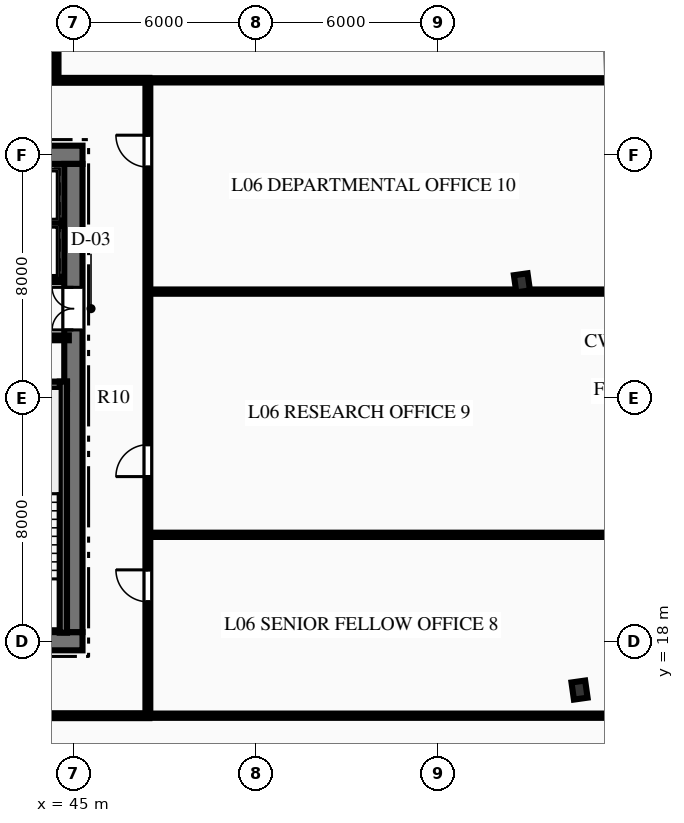
"""IFC4 building model, lengths in metres.
Left out: names, types, materials, properties, quantities, classifications, styles, units other than length and angle.
Written with IfcOpenShell. Run it as: python <this file> out.ifc"""

import sys

from ifc_helpers import new_model, si_unit, direction, frame, frame_2d, origin, origin_2d, place, context, subcontext, project, spatial, rectangle, i_section, extrude, element, fill, save


model = new_model("IFC4")
c1 = context("Model", 3, precision=1e-05, world=origin(), true_north=direction((0.0, 1.0)))
c2 = subcontext(c1, "Body", "Model", "MODEL_VIEW")
j1 = project(units=[si_unit("LENGTHUNIT", "METRE"), si_unit("PLANEANGLEUNIT", "RADIAN")], contexts=[c1])
p1 = place(None, origin())
s1 = spatial("IfcSite", under=j1, at=p1, CompositionType="ELEMENT")
p2 = place(p1, origin())
s2 = spatial("IfcBuilding", under=s1, at=p2, CompositionType="ELEMENT")
p3 = place(p2, frame((0.0, 0.0, 32.7)))
s3 = spatial("IfcBuildingStorey", under=s2, at=p3, CompositionType="ELEMENT", Elevation=32.7)
p4 = place(p3, frame((26.7, 18.0, 0.0), z_axis=(0.0, 0.0, 1.0), x_axis=(1.0, 0.0, 0.0)))
e1 = element("IfcWall", 1, at=p4, inside=s3, PredefinedType="SHEAR", context=c2, shape_type="SweptSolid", body=[
    extrude(rectangle(XDim=18.6, YDim=0.6, at=frame_2d((9.3, 0.0))), origin(), (0.0, 0.0, 1.0), 3.75),
])
p5 = place(p4, frame((7.4, 0.0, 0.0)))
e2 = element("IfcOpeningElement", 2, at=p5, cuts=e1, PredefinedType="OPENING", context=c2, shape_type="SweptSolid", body=[
    extrude(rectangle(XDim=1.1, YDim=2.15, at=frame_2d((0.55, 1.075))), frame((0.0, 0.31, 0.0), z_axis=(0.0, -1.0, 0.0), x_axis=(1.0, 0.0, 0.0)), (0.0, 0.0, 1.0), 0.62),
])
p6 = place(p4, frame((10.1, 0.0, 0.0)))
e3 = element("IfcOpeningElement", 3, at=p6, cuts=e1, PredefinedType="OPENING", context=c2, shape_type="SweptSolid", body=[
    extrude(rectangle(XDim=1.1, YDim=2.15, at=frame_2d((0.55, 1.075))), frame((0.0, 0.31, 0.0), z_axis=(0.0, -1.0, 0.0), x_axis=(1.0, 0.0, 0.0)), (0.0, 0.0, 1.0), 0.62),
])
p7 = place(p3, frame((26.7, 34.0, 0.0), z_axis=(0.0, 0.0, 1.0), x_axis=(1.0, 0.0, 0.0)))
e4 = element("IfcWall", 4, at=p7, inside=s3, PredefinedType="SHEAR", context=c2, shape_type="SweptSolid", body=[
    extrude(rectangle(XDim=18.6, YDim=0.6, at=frame_2d((9.3, 0.0))), origin(), (0.0, 0.0, 1.0), 3.75),
])
p8 = place(p7, frame((1.265, 0.0, 0.0)))
e5 = element("IfcOpeningElement", 5, at=p8, cuts=e4, PredefinedType="OPENING", context=c2, shape_type="SweptSolid", body=[
    extrude(rectangle(XDim=1.1, YDim=2.15, at=frame_2d((0.55, 1.075))), frame((0.0, 0.31, 0.0), z_axis=(0.0, -1.0, 0.0), x_axis=(1.0, 0.0, 0.0)), (0.0, 0.0, 1.0), 0.62),
])
p9 = place(p7, frame((3.515, 0.0, 0.0)))
e6 = element("IfcOpeningElement", 6, at=p9, cuts=e4, PredefinedType="OPENING", context=c2, shape_type="SweptSolid", body=[
    extrude(rectangle(XDim=1.1, YDim=2.15, at=frame_2d((0.55, 1.075))), frame((0.0, 0.31, 0.0), z_axis=(0.0, -1.0, 0.0), x_axis=(1.0, 0.0, 0.0)), (0.0, 0.0, 1.0), 0.62),
])
p10 = place(p7, frame((13.985, 0.0, 0.0)))
e7 = element("IfcOpeningElement", 7, at=p10, cuts=e4, PredefinedType="OPENING", context=c2, shape_type="SweptSolid", body=[
    extrude(rectangle(XDim=1.1, YDim=2.15, at=frame_2d((0.55, 1.075))), frame((0.0, 0.31, 0.0), z_axis=(0.0, -1.0, 0.0), x_axis=(1.0, 0.0, 0.0)), (0.0, 0.0, 1.0), 0.62),
])
p11 = place(p7, frame((16.235, 0.0, 0.0)))
e8 = element("IfcOpeningElement", 8, at=p11, cuts=e4, PredefinedType="OPENING", context=c2, shape_type="SweptSolid", body=[
    extrude(rectangle(XDim=1.1, YDim=2.15, at=frame_2d((0.55, 1.075))), frame((0.0, 0.31, 0.0), z_axis=(0.0, -1.0, 0.0), x_axis=(1.0, 0.0, 0.0)), (0.0, 0.0, 1.0), 0.62),
])
p12 = place(p3, frame((45.0, 18.3, 0.0), z_axis=(0.0, 0.0, 1.0), x_axis=(0.0, 1.0, 0.0)))
e9 = element("IfcWall", 9, at=p12, inside=s3, PredefinedType="SHEAR", context=c2, shape_type="SweptSolid", body=[
    extrude(rectangle(XDim=15.4, YDim=0.6, at=frame_2d((7.7, 0.0))), origin(), (0.0, 0.0, 1.0), 3.75),
])
p13 = place(p12, frame((9.94, 0.0, 0.0)))
e10 = element("IfcOpeningElement", 10, at=p13, cuts=e9, PredefinedType="OPENING", context=c2, shape_type="SweptSolid", body=[
    extrude(rectangle(XDim=1.4, YDim=2.2, at=frame_2d((0.7, 1.1))), frame((0.0, 0.31, 0.0), z_axis=(0.0, -1.0, 0.0), x_axis=(1.0, 0.0, 0.0)), (0.0, 0.0, 1.0), 0.62),
])
p14 = place(p3, frame((40.81, 26.42, 0.0), z_axis=(0.0, 0.0, 1.0), x_axis=(1.0, 0.0, 0.0)))
e11 = element("IfcWall", 11, at=p14, inside=s3, PredefinedType="SHEAR", context=c2, shape_type="SweptSolid", body=[
    extrude(rectangle(XDim=3.98, YDim=0.24, at=frame_2d((1.99, 0.0))), origin(), (0.0, 0.0, 1.0), 3.75),
])
p15 = place(p3, frame((44.67, 18.28, 0.0), z_axis=(0.0, 0.0, 1.0), x_axis=(0.0, 1.0, 0.0)))
e12 = element("IfcWall", 12, at=p15, inside=s3, PredefinedType="SHEAR", context=c2, shape_type="SweptSolid", body=[
    extrude(rectangle(XDim=8.26, YDim=0.24, at=frame_2d((4.13, 0.0))), origin(), (0.0, 0.0, 1.0), 3.75),
])
for number, where, z_axis, x_axis in (
    (13, (61.648, 16.393, 0.0), (0.0, 0.0, 1.0), (0.99, 0.14, 0.0)),
    (14, (59.753, 29.789, 0.0), (0.0, 0.0, 1.0), (0.99, 0.14, 0.0)),
):
    element("IfcColumn", number, at=place(p3, frame(where, z_axis=z_axis, x_axis=x_axis)), inside=s3, PredefinedType="COLUMN", context=c2, shape_type="SweptSolid", body=[
        extrude(i_section(OverallWidth=0.454, OverallDepth=0.569, WebThickness=0.078, FlangeThickness=0.125, at=origin_2d()), origin(), (0.0, 0.0, 1.0), 3.75),
    ])
p16 = place(p3, frame((40.8, 27.98, 0.0), z_axis=(0.0, 0.0, 1.0), x_axis=(1.0, 0.0, 0.0)))
e15 = element("IfcWall", 15, at=p16, inside=s3, PredefinedType="PARTITIONING", context=c2, shape_type="SweptSolid", body=[
    extrude(rectangle(XDim=4.05, YDim=0.16, at=frame_2d((2.025, 0.0))), origin(), (0.0, 0.0, 1.0), 3.44),
])
p17 = place(p16, frame((0.407, 0.0, 0.0)))
e16 = element("IfcOpeningElement", 16, at=p17, cuts=e15, PredefinedType="OPENING", context=c2, shape_type="SweptSolid", body=[
    extrude(rectangle(XDim=0.9, YDim=2.15, at=frame_2d((0.45, 1.075))), frame((0.0, 0.09, 0.0), z_axis=(0.0, -1.0, 0.0), x_axis=(1.0, 0.0, 0.0)), (0.0, 0.0, 1.0), 0.18),
])
p18 = place(p16, frame((2.2, 0.0, 0.0)))
e17 = element("IfcOpeningElement", 17, at=p18, cuts=e15, PredefinedType="OPENING", context=c2, shape_type="SweptSolid", body=[
    extrude(rectangle(XDim=0.9, YDim=2.15, at=frame_2d((0.45, 1.075))), frame((0.0, 0.09, 0.0), z_axis=(0.0, -1.0, 0.0), x_axis=(1.0, 0.0, 0.0)), (0.0, 0.0, 1.0), 0.18),
])
p19 = place(p3, frame((40.12, 29.9, 0.0), z_axis=(0.0, 0.0, 1.0), x_axis=(1.0, 0.0, 0.0)))
e18 = element("IfcWall", 18, at=p19, inside=s3, PredefinedType="PARTITIONING", context=c2, shape_type="SweptSolid", body=[
    extrude(rectangle(XDim=4.43, YDim=0.18, at=frame_2d((2.215, 0.0))), origin(), (0.0, 0.0, 1.0), 3.44),
])
p20 = place(p19, frame((0.565, 0.0, 0.0)))
e19 = element("IfcOpeningElement", 19, at=p20, cuts=e18, PredefinedType="OPENING", context=c2, shape_type="SweptSolid", body=[
    extrude(rectangle(XDim=1.1, YDim=2.15, at=frame_2d((0.55, 1.075))), frame((0.0, 0.1, 0.0), z_axis=(0.0, -1.0, 0.0), x_axis=(1.0, 0.0, 0.0)), (0.0, 0.0, 1.0), 0.2),
])
p21 = place(p19, frame((2.815, 0.0, 0.0)))
e20 = element("IfcOpeningElement", 20, at=p21, cuts=e18, PredefinedType="OPENING", context=c2, shape_type="SweptSolid", body=[
    extrude(rectangle(XDim=1.1, YDim=2.15, at=frame_2d((0.55, 1.075))), frame((0.0, 0.1, 0.0), z_axis=(0.0, -1.0, 0.0), x_axis=(1.0, 0.0, 0.0)), (0.0, 0.0, 1.0), 0.2),
])
p22 = place(p3, frame((40.12, 31.75, 0.0), z_axis=(0.0, 0.0, 1.0), x_axis=(1.0, 0.0, 0.0)))
e21 = element("IfcWall", 21, at=p22, inside=s3, PredefinedType="PARTITIONING", context=c2, shape_type="SweptSolid", body=[
    extrude(rectangle(XDim=4.43, YDim=0.18, at=frame_2d((2.215, 0.0))), origin(), (0.0, 0.0, 1.0), 3.44),
])
p23 = place(p3, frame((24.5, 15.55, 0.0), z_axis=(0.0, 0.0, 1.0), x_axis=(1.0, 0.0, 0.0)))
e22 = element("IfcWall", 22, at=p23, inside=s3, PredefinedType="PARTITIONING", context=c2, shape_type="SweptSolid", body=[
    extrude(rectangle(XDim=23.0, YDim=0.16, at=frame_2d((11.5, 0.0))), origin(), (0.0, 0.0, 1.0), 3.44),
])
p24 = place(p23, frame((3.525, 0.0, 0.0)))
e23 = element("IfcOpeningElement", 23, at=p24, cuts=e22, PredefinedType="OPENING", context=c2, shape_type="SweptSolid", body=[
    extrude(rectangle(XDim=0.95, YDim=2.15, at=frame_2d((0.475, 1.075))), frame((0.0, 0.09, 0.0), z_axis=(0.0, -1.0, 0.0), x_axis=(1.0, 0.0, 0.0)), (0.0, 0.0, 1.0), 0.18),
])
p25 = place(p23, frame((18.151, 0.0, 0.0)))
e24 = element("IfcOpeningElement", 24, at=p25, cuts=e22, PredefinedType="OPENING", context=c2, shape_type="SweptSolid", body=[
    extrude(rectangle(XDim=1.05, YDim=2.15, at=frame_2d((0.525, 1.075))), frame((0.0, 0.09, 0.0), z_axis=(0.0, -1.0, 0.0), x_axis=(1.0, 0.0, 0.0)), (0.0, 0.0, 1.0), 0.18),
])
p26 = place(p3, frame((24.5, 36.45, 0.0), z_axis=(0.0, 0.0, 1.0), x_axis=(1.0, 0.0, 0.0)))
e25 = element("IfcWall", 25, at=p26, inside=s3, PredefinedType="PARTITIONING", context=c2, shape_type="SweptSolid", body=[
    extrude(rectangle(XDim=23.0, YDim=0.16, at=frame_2d((11.5, 0.0))), origin(), (0.0, 0.0, 1.0), 3.44),
])
p27 = place(p26, frame((13.75, 0.0, 0.0)))
e26 = element("IfcOpeningElement", 26, at=p27, cuts=e25, PredefinedType="OPENING", context=c2, shape_type="SweptSolid", body=[
    extrude(rectangle(XDim=0.9, YDim=2.15, at=frame_2d((0.45, 1.075))), frame((0.0, 0.09, 0.0), z_axis=(0.0, -1.0, 0.0), x_axis=(1.0, 0.0, 0.0)), (0.0, 0.0, 1.0), 0.18),
])
p28 = place(p26, frame((16.05, 0.0, 0.0)))
e27 = element("IfcOpeningElement", 27, at=p28, cuts=e25, PredefinedType="OPENING", context=c2, shape_type="SweptSolid", body=[
    extrude(rectangle(XDim=0.9, YDim=2.15, at=frame_2d((0.45, 1.075))), frame((0.0, 0.09, 0.0), z_axis=(0.0, -1.0, 0.0), x_axis=(1.0, 0.0, 0.0)), (0.0, 0.0, 1.0), 0.18),
])
p29 = place(p26, frame((18.3, 0.0, 0.0)))
e28 = element("IfcOpeningElement", 28, at=p29, cuts=e25, PredefinedType="OPENING", context=c2, shape_type="SweptSolid", body=[
    extrude(rectangle(XDim=1.0, YDim=2.15, at=frame_2d((0.5, 1.075))), frame((0.0, 0.09, 0.0), z_axis=(0.0, -1.0, 0.0), x_axis=(1.0, 0.0, 0.0)), (0.0, 0.0, 1.0), 0.18),
])
p30 = place(p26, frame((2.915, 0.0, 0.0)))
e29 = element("IfcOpeningElement", 29, at=p30, cuts=e25, PredefinedType="OPENING", context=c2, shape_type="SweptSolid", body=[
    extrude(rectangle(XDim=1.05, YDim=2.15, at=frame_2d((0.525, 1.075))), frame((0.0, 0.09, 0.0), z_axis=(0.0, -1.0, 0.0), x_axis=(1.0, 0.0, 0.0)), (0.0, 0.0, 1.0), 0.18),
])
p31 = place(p26, frame((11.335, 0.0, 0.0)))
e30 = element("IfcOpeningElement", 30, at=p31, cuts=e25, PredefinedType="OPENING", context=c2, shape_type="SweptSolid", body=[
    extrude(rectangle(XDim=1.05, YDim=2.15, at=frame_2d((0.525, 1.075))), frame((0.0, 0.09, 0.0), z_axis=(0.0, -1.0, 0.0), x_axis=(1.0, 0.0, 0.0)), (0.0, 0.0, 1.0), 0.18),
])
p32 = place(p3, frame((47.45, 15.55, 0.0), z_axis=(0.0, 0.0, 1.0), x_axis=(0.0, 1.0, 0.0)))
e31 = element("IfcWall", 31, at=p32, inside=s3, PredefinedType="PARTITIONING", context=c2, shape_type="SweptSolid", body=[
    extrude(rectangle(XDim=20.9, YDim=0.16, at=frame_2d((10.45, 0.0))), origin(), (0.0, 0.0, 1.0), 3.44),
])
p33 = place(p32, frame((3.747, 0.0, 0.0)))
e32 = element("IfcOpeningElement", 32, at=p33, cuts=e31, PredefinedType="OPENING", context=c2, shape_type="SweptSolid", body=[
    extrude(rectangle(XDim=1.05, YDim=2.15, at=frame_2d((0.525, 1.075))), frame((0.0, 0.09, 0.0), z_axis=(0.0, -1.0, 0.0), x_axis=(1.0, 0.0, 0.0)), (0.0, 0.0, 1.0), 0.18),
])
p34 = place(p32, frame((7.865, 0.0, 0.0)))
e33 = element("IfcOpeningElement", 33, at=p34, cuts=e31, PredefinedType="OPENING", context=c2, shape_type="SweptSolid", body=[
    extrude(rectangle(XDim=1.05, YDim=2.15, at=frame_2d((0.525, 1.075))), frame((0.0, 0.09, 0.0), z_axis=(0.0, -1.0, 0.0), x_axis=(1.0, 0.0, 0.0)), (0.0, 0.0, 1.0), 0.18),
])
p35 = place(p32, frame((18.045, 0.0, 0.0)))
e34 = element("IfcOpeningElement", 34, at=p35, cuts=e31, PredefinedType="OPENING", context=c2, shape_type="SweptSolid", body=[
    extrude(rectangle(XDim=1.05, YDim=2.15, at=frame_2d((0.525, 1.075))), frame((0.0, 0.09, 0.0), z_axis=(0.0, -1.0, 0.0), x_axis=(1.0, 0.0, 0.0)), (0.0, 0.0, 1.0), 0.18),
])
p36 = place(p3, frame((44.45, 36.45, 0.0), z_axis=(0.0, 0.0, 1.0), x_axis=(0.0, 1.0, 0.0)))
e35 = element("IfcWall", 35, at=p36, inside=s3, PredefinedType="PARTITIONING", context=c2, shape_type="SweptSolid", body=[
    extrude(rectangle(XDim=3.9, YDim=0.12, at=frame_2d((1.95, 0.0))), origin(), (0.0, 0.0, 1.0), 3.44),
])
p37 = place(p3, frame((47.45, 15.55, 0.0), z_axis=(0.0, 0.0, 1.0), x_axis=(1.0, 0.0, 0.0)))
e36 = element("IfcWall", 36, at=p37, inside=s3, PredefinedType="PARTITIONING", context=c2, shape_type="SweptSolid", body=[
    extrude(rectangle(XDim=15.725, YDim=0.14, at=frame_2d((7.863, 0.0))), origin(), (0.0, 0.0, 1.0), 3.44),
])
p38 = place(p3, frame((47.45, 36.45, 0.0), z_axis=(0.0, 0.0, 1.0), x_axis=(1.0, 0.0, 0.0)))
e37 = element("IfcWall", 37, at=p38, inside=s3, PredefinedType="PARTITIONING", context=c2, shape_type="SweptSolid", body=[
    extrude(rectangle(XDim=15.306, YDim=0.14, at=frame_2d((7.653, 0.0))), origin(), (0.0, 0.0, 1.0), 3.44),
])
p39 = place(p3, frame((47.45, 21.5, 0.0), z_axis=(0.0, 0.0, 1.0), x_axis=(1.0, 0.0, 0.0)))
e38 = element("IfcWall", 38, at=p39, inside=s3, PredefinedType="PARTITIONING", context=c2, shape_type="SweptSolid", body=[
    extrude(rectangle(XDim=15.606, YDim=0.14, at=frame_2d((7.803, 0.0))), origin(), (0.0, 0.0, 1.0), 3.44),
])
p40 = place(p3, frame((47.45, 29.5, 0.0), z_axis=(0.0, 0.0, 1.0), x_axis=(1.0, 0.0, 0.0)))
e39 = element("IfcWall", 39, at=p40, inside=s3, PredefinedType="PARTITIONING", context=c2, shape_type="SweptSolid", body=[
    extrude(rectangle(XDim=15.445, YDim=0.14, at=frame_2d((7.723, 0.0))), origin(), (0.0, 0.0, 1.0), 2.739),
])
p41 = place(p13, origin())
e40 = element("IfcDoor", 40, at=p41, inside=s3, OperationType="DOUBLE_DOOR_SINGLE_SWING", PredefinedType="DOOR", context=c2, shape_type="SweptSolid", body=[
    extrude(rectangle(XDim=1.4, YDim=2.2, at=frame_2d((0.7, 1.1))), frame((0.0, 0.025, 0.0), z_axis=(0.0, -1.0, 0.0), x_axis=(1.0, 0.0, 0.0)), (0.0, 0.0, 1.0), 0.05),
])
fill(e10, e40)
p42 = place(p33, origin())
e41 = element("IfcDoor", 41, at=p42, inside=s3, OperationType="SINGLE_SWING_RIGHT", PredefinedType="DOOR", context=c2, shape_type="SweptSolid", body=[
    extrude(rectangle(XDim=1.05, YDim=2.15, at=frame_2d((0.525, 1.075))), frame((0.0, 0.025, 0.0), z_axis=(0.0, -1.0, 0.0), x_axis=(1.0, 0.0, 0.0)), (0.0, 0.0, 1.0), 0.05),
])
fill(e32, e41)
p43 = place(p34, origin())
e42 = element("IfcDoor", 42, at=p43, inside=s3, OperationType="SINGLE_SWING_LEFT", PredefinedType="DOOR", context=c2, shape_type="SweptSolid", body=[
    extrude(rectangle(XDim=1.05, YDim=2.15, at=frame_2d((0.525, 1.075))), frame((0.0, 0.025, 0.0), z_axis=(0.0, -1.0, 0.0), x_axis=(1.0, 0.0, 0.0)), (0.0, 0.0, 1.0), 0.05),
])
fill(e33, e42)
p44 = place(p35, origin())
e43 = element("IfcDoor", 43, at=p44, inside=s3, OperationType="SINGLE_SWING_RIGHT", PredefinedType="DOOR", context=c2, shape_type="SweptSolid", body=[
    extrude(rectangle(XDim=1.05, YDim=2.15, at=frame_2d((0.525, 1.075))), frame((0.0, 0.025, 0.0), z_axis=(0.0, -1.0, 0.0), x_axis=(1.0, 0.0, 0.0)), (0.0, 0.0, 1.0), 0.05),
])
fill(e34, e43)
save(model, sys.argv[1])
